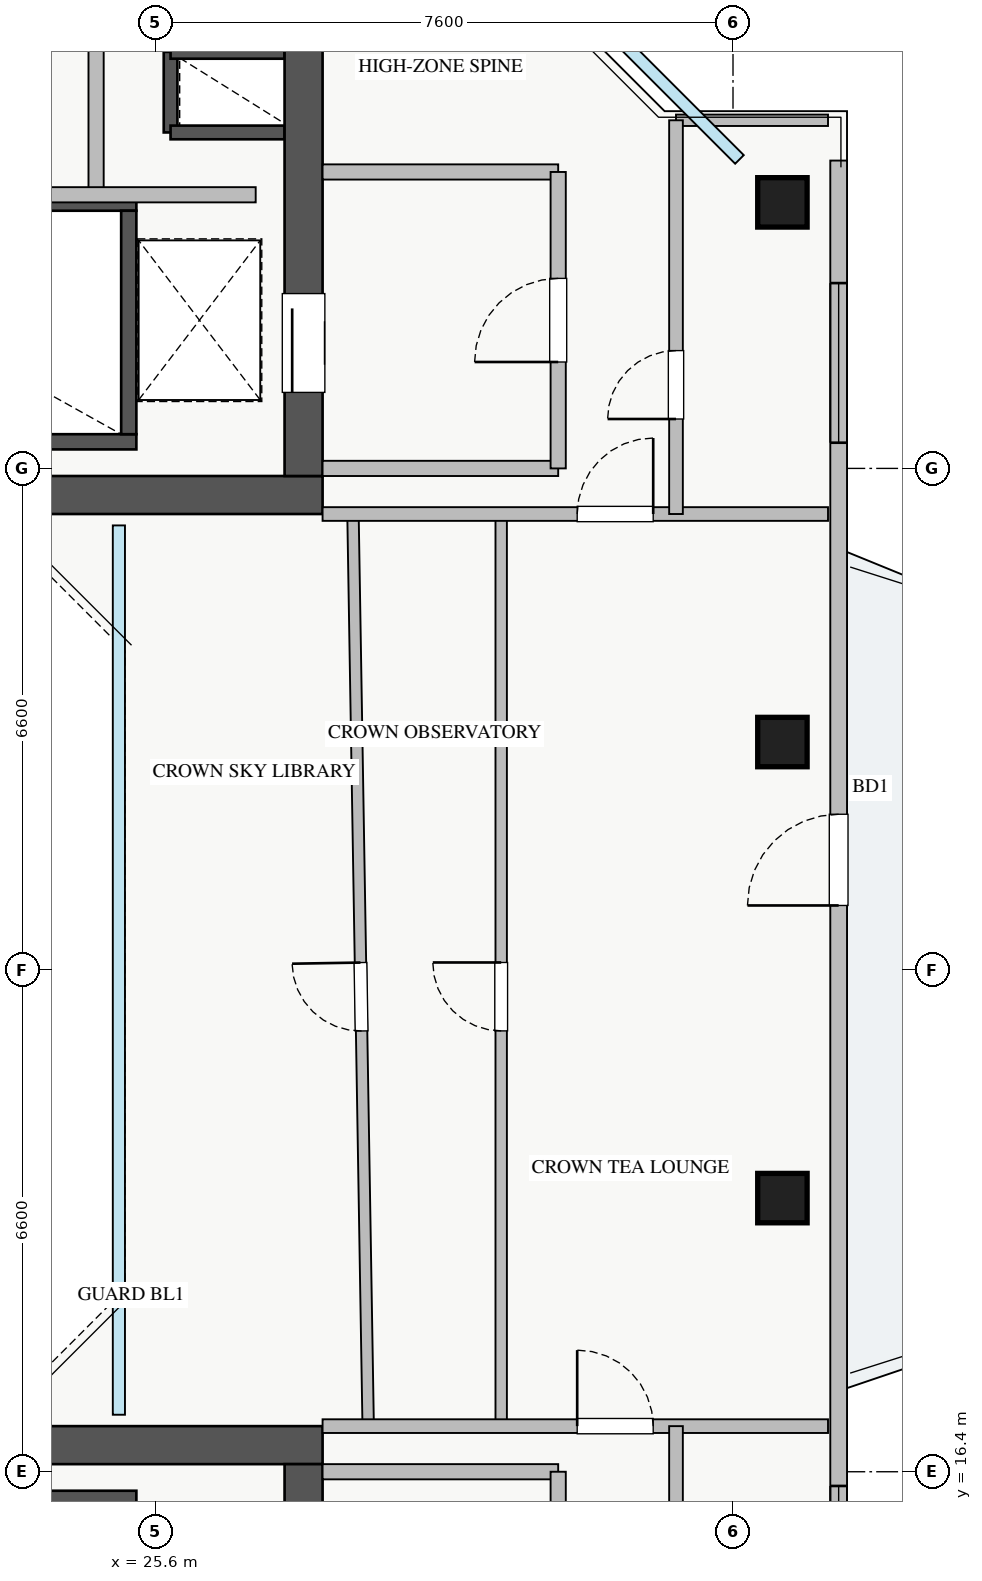
"""IFC4 building model, lengths in metres.
Left out: names, types, materials, properties, quantities, classifications, styles, units other than length and angle.
Written with IfcOpenShell. Run it as: python <this file> out.ifc"""

import sys

from ifc_helpers import new_model, si_unit, direction, frame, frame_2d, origin, origin_2d, place, context, subcontext, project, spatial, rectangle, extrude, source, transform, mapped, element, fill, save


model = new_model("IFC4")
c1 = context("Model", 3, precision=1e-05, world=origin(), true_north=direction((0.0, 1.0)))
c2 = subcontext(c1, "Body", "Model", "MODEL_VIEW")
j1 = project(units=[si_unit("LENGTHUNIT", "METRE"), si_unit("PLANEANGLEUNIT", "RADIAN")], contexts=[c1])
p1 = place(None, origin())
s1 = spatial("IfcSite", under=j1, at=p1, CompositionType="ELEMENT")
p2 = place(p1, origin())
s2 = spatial("IfcBuilding", under=s1, at=p2, CompositionType="ELEMENT")
p3 = place(p2, frame((0.0, 0.0, 260.0)))
s3 = spatial("IfcBuildingStorey", under=s2, at=p3, CompositionType="ELEMENT", Elevation=260.0)
p4 = place(p3, frame((25.8, 34.02, 0.0), z_axis=(0.0, 0.0, 1.0), x_axis=(0.0, 1.0, 0.0)))
e1 = element("IfcWall", 1, at=p4, inside=s3, PredefinedType="SHEAR", context=c2, shape_type="SweptSolid", body=[
    extrude(rectangle(XDim=1.06, YDim=0.18, at=frame_2d((0.53, 0.0))), origin(), (0.0, 0.0, 1.0), 3.03),
])
for number, where, z_axis, x_axis in (
    (2, (25.8, 35.08, 0.0), (0.0, 0.0, 1.0), (1.0, 0.0, 0.0)),
    (3, (25.8, 34.02, 0.0), (0.0, 0.0, 1.0), (1.0, 0.0, 0.0)),
):
    element("IfcWall", number, at=place(p3, frame(where, z_axis=z_axis, x_axis=x_axis)), inside=s3, PredefinedType="SHEAR", context=c2, shape_type="SweptSolid", body=[
        extrude(rectangle(XDim=1.5, YDim=0.18, at=frame_2d((0.75, 0.0))), origin(), (0.0, 0.0, 1.0), 3.03),
    ])
p5 = place(p3, frame((18.2, 29.95, 0.0), z_axis=(0.0, 0.0, 1.0), x_axis=(1.0, 0.0, 0.0)))
e4 = element("IfcWall", 4, at=p5, inside=s3, PredefinedType="SHEAR", context=c2, shape_type="SweptSolid", body=[
    extrude(rectangle(XDim=7.15, YDim=0.2, at=frame_2d((3.575, 0.0))), origin(), (0.0, 0.0, 1.0), 3.25),
])
p6 = place(p3, frame((18.2, 33.09, 0.0), z_axis=(0.0, 0.0, 1.0), x_axis=(1.0, 0.0, 0.0)))
e5 = element("IfcWall", 5, at=p6, inside=s3, PredefinedType="SHEAR", context=c2, shape_type="SweptSolid", body=[
    extrude(rectangle(XDim=7.15, YDim=0.2, at=frame_2d((3.575, 0.0))), origin(), (0.0, 0.0, 1.0), 3.25),
])
p7 = place(p6, frame((0.35, 0.0, 0.0)))
e6 = element("IfcOpeningElement", 6, at=p7, cuts=e5, PredefinedType="OPENING", context=c2, shape_type="SweptSolid", body=[
    extrude(rectangle(XDim=1.1, YDim=2.05, at=frame_2d((0.55, 1.025))), frame((0.0, 0.11, 0.0), z_axis=(0.0, -1.0, 0.0), x_axis=(1.0, 0.0, 0.0)), (0.0, 0.0, 1.0), 0.22),
])
p8 = place(p3, frame((25.25, 30.05, 0.0), z_axis=(0.0, 0.0, 1.0), x_axis=(0.0, 1.0, 0.0)))
e7 = element("IfcWall", 7, at=p8, inside=s3, PredefinedType="SHEAR", context=c2, shape_type="SweptSolid", body=[
    extrude(rectangle(XDim=2.94, YDim=0.2, at=frame_2d((1.47, 0.0))), origin(), (0.0, 0.0, 1.0), 3.25),
])
p9 = place(p3, frame((18.2, 16.05, 0.0), z_axis=(0.0, 0.0, 1.0), x_axis=(1.0, 0.0, 0.0)))
e8 = element("IfcWall", 8, at=p9, inside=s3, PredefinedType="SHEAR", context=c2, shape_type="SweptSolid", body=[
    extrude(rectangle(XDim=7.15, YDim=0.2, at=frame_2d((3.575, 0.0))), origin(), (0.0, 0.0, 1.0), 3.25),
])
p10 = place(p3, frame((10.2, 29.25, 0.0), z_axis=(0.0, 0.0, 1.0), x_axis=(1.0, 0.0, 0.0)))
e9 = element("IfcWall", 9, at=p10, inside=s3, PredefinedType="SHEAR", context=c2, shape_type="SweptSolid", body=[
    extrude(rectangle(XDim=17.6, YDim=0.5, at=frame_2d((8.8, 0.0))), origin(), (0.0, 0.0, 1.0), 3.25),
])
p11 = place(p3, frame((27.55, 29.5, 0.0), z_axis=(0.0, 0.0, 1.0), x_axis=(0.0, 1.0, 0.0)))
e10 = element("IfcWall", 10, at=p11, inside=s3, PredefinedType="SHEAR", context=c2, shape_type="SweptSolid", body=[
    extrude(rectangle(XDim=6.2, YDim=0.5, at=frame_2d((3.1, 0.0))), origin(), (0.0, 0.0, 1.0), 3.25),
])
p12 = place(p11, frame((1.1, 0.0, 0.0)))
e11 = element("IfcOpeningElement", 11, at=p12, cuts=e10, PredefinedType="OPENING", context=c2, shape_type="SweptSolid", body=[
    extrude(rectangle(XDim=1.3, YDim=2.05, at=frame_2d((0.65, 1.025))), frame((0.0, 0.26, 0.0), z_axis=(0.0, -1.0, 0.0), x_axis=(1.0, 0.0, 0.0)), (0.0, 0.0, 1.0), 0.52),
])
p13 = place(p3, frame((10.2, 16.75, 0.0), z_axis=(0.0, 0.0, 1.0), x_axis=(1.0, 0.0, 0.0)))
e12 = element("IfcWall", 12, at=p13, inside=s3, PredefinedType="SHEAR", context=c2, shape_type="SweptSolid", body=[
    extrude(rectangle(XDim=17.6, YDim=0.5, at=frame_2d((8.8, 0.0))), origin(), (0.0, 0.0, 1.0), 3.25),
])
p14 = place(p3, frame((27.55, 10.3, 0.0), z_axis=(0.0, 0.0, 1.0), x_axis=(0.0, 1.0, 0.0)))
e13 = element("IfcWall", 13, at=p14, inside=s3, PredefinedType="SHEAR", context=c2, shape_type="SweptSolid", body=[
    extrude(rectangle(XDim=6.2, YDim=0.5, at=frame_2d((3.1, 0.0))), origin(), (0.0, 0.0, 1.0), 3.25),
])
p15 = place(p14, frame((2.1, 0.0, 0.0)))
e14 = element("IfcOpeningElement", 14, at=p15, cuts=e13, PredefinedType="OPENING", context=c2, shape_type="SweptSolid", body=[
    extrude(rectangle(XDim=1.3, YDim=2.05, at=frame_2d((0.65, 1.025))), frame((0.0, 0.26, 0.0), z_axis=(0.0, -1.0, 0.0), x_axis=(1.0, 0.0, 0.0)), (0.0, 0.0, 1.0), 0.52),
])
m1 = source(origin(), c2, "Body", "SweptSolid", [
    extrude(rectangle(XDim=0.65, YDim=0.65, at=origin_2d()), origin(), (0.0, 0.0, 1.0), 3.25),
])
for number, where, z_axis, x_axis in (
    (15, (33.85, 20.0, 0.0), (0.0, 0.0, 1.0), (1.0, 0.0, 0.0)),
    (16, (33.85, 26.0, 0.0), (0.0, 0.0, 1.0), (1.0, 0.0, 0.0)),
    (17, (33.85, 33.1, 0.0), (0.0, 0.0, 1.0), (1.0, 0.0, 0.0)),
):
    element("IfcColumn", number, at=place(p3, frame(where, z_axis=z_axis, x_axis=x_axis)), inside=s3, PredefinedType="COLUMN", context=c2, shape_type="MappedRepresentation", body=[
        mapped(m1, transform((0.0, 0.0, 0.0), x_axis=(1.0, 0.0, 0.0), y_axis=(0.0, 1.0, 0.0), z_axis=(0.0, 0.0, 1.0), scale=1.0)),
    ])
p16 = place(p3, frame((34.59, 12.35, 0.0), z_axis=(0.0, 0.0, 1.0), x_axis=(0.0, 1.0, 0.0)))
e18 = element("IfcWall", 18, at=p16, inside=s3, PredefinedType="STANDARD", context=c2, shape_type="SweptSolid", body=[
    extrude(rectangle(XDim=21.3, YDim=0.22, at=frame_2d((10.65, 0.0))), origin(), (0.0, 0.0, 1.0), 2.57),
])
p17 = place(p16, frame((11.5, 0.0, 0.0)))
e19 = element("IfcOpeningElement", 19, at=p17, cuts=e18, PredefinedType="OPENING", context=c2, shape_type="SweptSolid", body=[
    extrude(rectangle(XDim=1.2, YDim=2.1, at=frame_2d((0.6, 1.05))), frame((0.0, 0.12, 0.0), z_axis=(0.0, -1.0, 0.0), x_axis=(1.0, 0.0, 0.0)), (0.0, 0.0, 1.0), 0.24),
])
p18 = place(p16, frame((1.463, 0.0, 0.9)))
e20 = element("IfcOpeningElement", 20, at=p18, cuts=e18, PredefinedType="OPENING", context=c2, shape_type="SweptSolid", body=[
    extrude(rectangle(XDim=2.4, YDim=1.48, at=frame_2d((1.2, 0.74))), frame((0.0, 0.12, 0.0), z_axis=(0.0, -1.0, 0.0), x_axis=(1.0, 0.0, 0.0)), (0.0, 0.0, 1.0), 0.24),
])
p19 = place(p16, frame((17.588, 0.0, 0.9)))
e21 = element("IfcOpeningElement", 21, at=p19, cuts=e18, PredefinedType="OPENING", context=c2, shape_type="SweptSolid", body=[
    extrude(rectangle(XDim=2.1, YDim=1.48, at=frame_2d((1.05, 0.74))), frame((0.0, 0.12, 0.0), z_axis=(0.0, -1.0, 0.0), x_axis=(1.0, 0.0, 0.0)), (0.0, 0.0, 1.0), 0.24),
])
for number, where, z_axis, x_axis in (
    (22, (27.8, 29.6, 0.0), (0.0, 0.0, 1.0), (1.0, 0.0, 0.0)),
    (23, (27.8, 33.5, 0.0), (0.0, 0.0, 1.0), (1.0, 0.0, 0.0)),
):
    element("IfcWall", number, at=place(p3, frame(where, z_axis=z_axis, x_axis=x_axis)), inside=s3, PredefinedType="PARTITIONING", context=c2, shape_type="SweptSolid", body=[
        extrude(rectangle(XDim=3.1, YDim=0.2, at=frame_2d((1.55, 0.0))), origin(), (0.0, 0.0, 1.0), 3.03),
    ])
p20 = place(p3, frame((30.9, 29.6, 0.0), z_axis=(0.0, 0.0, 1.0), x_axis=(0.0, 1.0, 0.0)))
e24 = element("IfcWall", 24, at=p20, inside=s3, PredefinedType="PARTITIONING", context=c2, shape_type="SweptSolid", body=[
    extrude(rectangle(XDim=3.9, YDim=0.2, at=frame_2d((1.95, 0.0))), origin(), (0.0, 0.0, 1.0), 2.781),
])
p21 = place(p20, frame((1.4, 0.0, 0.0)))
e25 = element("IfcOpeningElement", 25, at=p21, cuts=e24, PredefinedType="OPENING", context=c2, shape_type="SweptSolid", body=[
    extrude(rectangle(XDim=1.1, YDim=2.05, at=frame_2d((0.55, 1.025))), frame((0.0, 0.11, 0.0), z_axis=(0.0, -1.0, 0.0), x_axis=(1.0, 0.0, 0.0)), (0.0, 0.0, 1.0), 0.22),
])
p22 = place(p3, frame((27.8, 16.4, 0.0), z_axis=(0.0, 0.0, 1.0), x_axis=(1.0, 0.0, 0.0)))
e26 = element("IfcWall", 26, at=p22, inside=s3, PredefinedType="PARTITIONING", context=c2, shape_type="SweptSolid", body=[
    extrude(rectangle(XDim=3.1, YDim=0.2, at=frame_2d((1.55, 0.0))), origin(), (0.0, 0.0, 1.0), 3.03),
])
p23 = place(p3, frame((30.9, 12.5, 0.0), z_axis=(0.0, 0.0, 1.0), x_axis=(0.0, 1.0, 0.0)))
e27 = element("IfcWall", 27, at=p23, inside=s3, PredefinedType="PARTITIONING", context=c2, shape_type="SweptSolid", body=[
    extrude(rectangle(XDim=3.9, YDim=0.2, at=frame_2d((1.95, 0.0))), origin(), (0.0, 0.0, 1.0), 2.781),
])
p24 = place(p23, frame((1.4, 0.0, 0.0)))
e28 = element("IfcOpeningElement", 28, at=p24, cuts=e27, PredefinedType="OPENING", context=c2, shape_type="SweptSolid", body=[
    extrude(rectangle(XDim=1.1, YDim=2.05, at=frame_2d((0.55, 1.025))), frame((0.0, 0.11, 0.0), z_axis=(0.0, -1.0, 0.0), x_axis=(1.0, 0.0, 0.0)), (0.0, 0.0, 1.0), 0.22),
])
p25 = place(p3, frame((24.82, 33.2, 0.0), z_axis=(0.0, 0.0, 1.0), x_axis=(0.0, 1.0, 0.0)))
e29 = element("IfcWall", 29, at=p25, inside=s3, PredefinedType="PARTITIONING", context=c2, shape_type="SweptSolid", body=[
    extrude(rectangle(XDim=2.65, YDim=0.2, at=frame_2d((1.325, 0.0))), origin(), (0.0, 0.0, 1.0), 3.03),
])
p26 = place(p3, frame((21.75, 33.2, 0.0), z_axis=(0.0, 0.0, 1.0), x_axis=(1.0, 0.0, 0.0)))
e30 = element("IfcWall", 30, at=p26, inside=s3, PredefinedType="PARTITIONING", context=c2, shape_type="SweptSolid", body=[
    extrude(rectangle(XDim=5.17, YDim=0.2, at=frame_2d((2.585, 0.0))), origin(), (0.0, 0.0, 1.0), 3.03),
])
p27 = place(p3, frame((28.2, 29.0, 0.0), z_axis=(0.0, 0.0, 1.0), x_axis=(0.016660285018, -0.99986120782, 0.0)))
e31 = element("IfcWall", 31, at=p27, inside=s3, PredefinedType="PARTITIONING", context=c2, shape_type="SweptSolid", body=[
    extrude(rectangle(XDim=12.002, YDim=0.15, at=frame_2d((6.001, 0.0))), origin(), (0.0, 0.0, 1.0), 3.03),
])
p28 = place(p27, frame((5.902, 0.0, 0.0)))
e32 = element("IfcOpeningElement", 32, at=p28, cuts=e31, PredefinedType="OPENING", context=c2, shape_type="SweptSolid", body=[
    extrude(rectangle(XDim=0.9, YDim=2.05, at=frame_2d((0.45, 1.025))), frame((0.0, 0.085, 0.0), z_axis=(0.0, -1.0, 0.0), x_axis=(1.0, 0.0, 0.0)), (0.0, 0.0, 1.0), 0.17),
])
p29 = place(p3, frame((30.15, 17.0, 0.0), z_axis=(0.0, 0.0, 1.0), x_axis=(0.0, 1.0, 0.0)))
e33 = element("IfcWall", 33, at=p29, inside=s3, PredefinedType="PARTITIONING", context=c2, shape_type="SweptSolid", body=[
    extrude(rectangle(XDim=12.0, YDim=0.15, at=frame_2d((6.0, 0.0))), origin(), (0.0, 0.0, 1.0), 3.03),
])
p30 = place(p29, frame((5.2, 0.0, 0.0)))
e34 = element("IfcOpeningElement", 34, at=p30, cuts=e33, PredefinedType="OPENING", context=c2, shape_type="SweptSolid", body=[
    extrude(rectangle(XDim=0.9, YDim=2.05, at=frame_2d((0.45, 1.025))), frame((0.0, 0.085, 0.0), z_axis=(0.0, -1.0, 0.0), x_axis=(1.0, 0.0, 0.0)), (0.0, 0.0, 1.0), 0.17),
])
p31 = place(p3, frame((27.8, 17.0, 0.0), z_axis=(0.0, 0.0, 1.0), x_axis=(1.0, 0.0, 0.0)))
e35 = element("IfcWall", 35, at=p31, inside=s3, PredefinedType="PARTITIONING", context=c2, shape_type="SweptSolid", body=[
    extrude(rectangle(XDim=6.65, YDim=0.18, at=frame_2d((3.325, 0.0))), origin(), (0.0, 0.0, 1.0), 3.03),
])
p32 = place(p31, frame((3.35, 0.0, 0.0)))
e36 = element("IfcOpeningElement", 36, at=p32, cuts=e35, PredefinedType="OPENING", context=c2, shape_type="SweptSolid", body=[
    extrude(rectangle(XDim=1.0, YDim=2.05, at=frame_2d((0.5, 1.025))), frame((0.0, 0.1, 0.0), z_axis=(0.0, -1.0, 0.0), x_axis=(1.0, 0.0, 0.0)), (0.0, 0.0, 1.0), 0.2),
])
p33 = place(p3, frame((27.8, 29.0, 0.0), z_axis=(0.0, 0.0, 1.0), x_axis=(1.0, 0.0, 0.0)))
e37 = element("IfcWall", 37, at=p33, inside=s3, PredefinedType="PARTITIONING", context=c2, shape_type="SweptSolid", body=[
    extrude(rectangle(XDim=6.65, YDim=0.18, at=frame_2d((3.325, 0.0))), origin(), (0.0, 0.0, 1.0), 3.03),
])
p34 = place(p33, frame((3.35, 0.0, 0.0)))
e38 = element("IfcOpeningElement", 38, at=p34, cuts=e37, PredefinedType="OPENING", context=c2, shape_type="SweptSolid", body=[
    extrude(rectangle(XDim=1.0, YDim=2.05, at=frame_2d((0.5, 1.025))), frame((0.0, 0.1, 0.0), z_axis=(0.0, -1.0, 0.0), x_axis=(1.0, 0.0, 0.0)), (0.0, 0.0, 1.0), 0.2),
])
p35 = place(p3, frame((32.45, 34.18, 0.0), z_axis=(0.0, 0.0, 1.0), x_axis=(1.0, 0.0, 0.0)))
e39 = element("IfcWall", 39, at=p35, inside=s3, PredefinedType="PARTITIONING", context=c2, shape_type="SweptSolid", body=[
    extrude(rectangle(XDim=2.0, YDim=0.15, at=frame_2d((1.0, 0.0))), origin(), (0.0, 0.0, 1.0), 3.03),
])
p36 = place(p3, frame((32.45, 29.0, 0.0), z_axis=(0.0, 0.0, 1.0), x_axis=(0.0, 1.0, 0.0)))
e40 = element("IfcWall", 40, at=p36, inside=s3, PredefinedType="PARTITIONING", context=c2, shape_type="SweptSolid", body=[
    extrude(rectangle(XDim=5.18, YDim=0.18, at=frame_2d((2.59, 0.0))), origin(), (0.0, 0.0, 1.0), 3.03),
])
p37 = place(p36, frame((1.25, 0.0, 0.0)))
e41 = element("IfcOpeningElement", 41, at=p37, cuts=e40, PredefinedType="OPENING", context=c2, shape_type="SweptSolid", body=[
    extrude(rectangle(XDim=0.9, YDim=2.05, at=frame_2d((0.45, 1.025))), frame((0.0, 0.1, 0.0), z_axis=(0.0, -1.0, 0.0), x_axis=(1.0, 0.0, 0.0)), (0.0, 0.0, 1.0), 0.2),
])
p38 = place(p3, frame((32.45, 11.82, 0.0), z_axis=(0.0, 0.0, 1.0), x_axis=(0.0, 1.0, 0.0)))
e42 = element("IfcWall", 42, at=p38, inside=s3, PredefinedType="PARTITIONING", context=c2, shape_type="SweptSolid", body=[
    extrude(rectangle(XDim=5.18, YDim=0.18, at=frame_2d((2.59, 0.0))), origin(), (0.0, 0.0, 1.0), 3.03),
])
p39 = place(p38, frame((1.25, 0.0, 0.0)))
e43 = element("IfcOpeningElement", 43, at=p39, cuts=e42, PredefinedType="OPENING", context=c2, shape_type="SweptSolid", body=[
    extrude(rectangle(XDim=0.9, YDim=2.05, at=frame_2d((0.45, 1.025))), frame((0.0, 0.1, 0.0), z_axis=(0.0, -1.0, 0.0), x_axis=(1.0, 0.0, 0.0)), (0.0, 0.0, 1.0), 0.2),
])
m2 = source(origin(), c2, "Body", "SweptSolid", [
    extrude(rectangle(XDim=1.2, YDim=2.1, at=frame_2d((0.6, 1.05))), frame((0.0, 0.025, 0.0), z_axis=(0.0, -1.0, 0.0), x_axis=(1.0, 0.0, 0.0)), (0.0, 0.0, 1.0), 0.05),
])
p40 = place(p17, origin())
e44 = element("IfcDoor", 44, at=p40, inside=s3, OperationType="SINGLE_SWING_LEFT", PredefinedType="DOOR", context=c2, shape_type="MappedRepresentation", body=[
    mapped(m2, transform((0.0, 0.0, 0.0), x_axis=(1.0, 0.0, 0.0), y_axis=(0.0, 1.0, 0.0), z_axis=(0.0, 0.0, 1.0), scale=1.0)),
])
fill(e19, e44)
m3 = source(origin(), c2, "Body", "SweptSolid", [
    extrude(rectangle(XDim=2.4, YDim=1.48, at=frame_2d((1.2, 0.74))), frame((0.0, 0.03, 0.0), z_axis=(0.0, -1.0, 0.0), x_axis=(1.0, 0.0, 0.0)), (0.0, 0.0, 1.0), 0.06),
])
p41 = place(p18, origin())
e45 = element("IfcWindow", 45, at=p41, inside=s3, PartitioningType="TRIPLE_PANEL_VERTICAL", PredefinedType="WINDOW", context=c2, shape_type="MappedRepresentation", body=[
    mapped(m3, transform((0.0, 0.0, 0.0), x_axis=(1.0, 0.0, 0.0), y_axis=(0.0, 1.0, 0.0), z_axis=(0.0, 0.0, 1.0), scale=1.0)),
])
fill(e20, e45)
m4 = source(origin(), c2, "Body", "SweptSolid", [
    extrude(rectangle(XDim=2.1, YDim=1.48, at=frame_2d((1.05, 0.74))), frame((0.0, 0.03, 0.0), z_axis=(0.0, -1.0, 0.0), x_axis=(1.0, 0.0, 0.0)), (0.0, 0.0, 1.0), 0.06),
])
p42 = place(p19, origin())
e46 = element("IfcWindow", 46, at=p42, inside=s3, PartitioningType="TRIPLE_PANEL_VERTICAL", PredefinedType="WINDOW", context=c2, shape_type="MappedRepresentation", body=[
    mapped(m4, transform((0.0, 0.0, 0.0), x_axis=(1.0, 0.0, 0.0), y_axis=(0.0, 1.0, 0.0), z_axis=(0.0, 0.0, 1.0), scale=1.0)),
])
fill(e21, e46)
m5 = source(origin(), c2, "Body", "SweptSolid", [
    extrude(rectangle(XDim=1.3, YDim=2.05, at=frame_2d((0.65, 1.025))), frame((0.0, 0.025, 0.0), z_axis=(0.0, -1.0, 0.0), x_axis=(1.0, 0.0, 0.0)), (0.0, 0.0, 1.0), 0.05),
])
p43 = place(p12, origin())
e47 = element("IfcDoor", 47, at=p43, inside=s3, OperationType="SLIDING_TO_LEFT", PredefinedType="DOOR", context=c2, shape_type="MappedRepresentation", body=[
    mapped(m5, transform((0.0, 0.0, 0.0), x_axis=(1.0, 0.0, 0.0), y_axis=(0.0, 1.0, 0.0), z_axis=(0.0, 0.0, 1.0), scale=1.0)),
])
fill(e11, e47)
m6 = source(origin(), c2, "Body", "SweptSolid", [
    extrude(rectangle(XDim=1.1, YDim=2.05, at=frame_2d((0.55, 1.025))), frame((0.0, 0.025, 0.0), z_axis=(0.0, -1.0, 0.0), x_axis=(1.0, 0.0, 0.0)), (0.0, 0.0, 1.0), 0.05),
])
p44 = place(p21, origin())
e48 = element("IfcDoor", 48, at=p44, inside=s3, OperationType="SINGLE_SWING_LEFT", PredefinedType="DOOR", context=c2, shape_type="MappedRepresentation", body=[
    mapped(m6, transform((0.0, 0.0, 0.0), x_axis=(1.0, 0.0, 0.0), y_axis=(0.0, 1.0, 0.0), z_axis=(0.0, 0.0, 1.0), scale=1.0)),
])
fill(e25, e48)
m7 = source(origin(), c2, "Body", "SweptSolid", [
    extrude(rectangle(XDim=0.9, YDim=2.05, at=frame_2d((0.45, 1.025))), frame((0.0, 0.025, 0.0), z_axis=(0.0, -1.0, 0.0), x_axis=(1.0, 0.0, 0.0)), (0.0, 0.0, 1.0), 0.05),
])
p45 = place(p28, frame((0.9, 0.0, 0.0), z_axis=(0.0, 0.0, 1.0), x_axis=(-1.0, 0.0, 0.0)))
e49 = element("IfcDoor", 49, at=p45, inside=s3, OperationType="SINGLE_SWING_LEFT", PredefinedType="DOOR", context=c2, shape_type="MappedRepresentation", body=[
    mapped(m7, transform((0.0, 0.0, 0.0), x_axis=(1.0, 0.0, 0.0), y_axis=(0.0, 1.0, 0.0), z_axis=(0.0, 0.0, 1.0), scale=1.0)),
])
fill(e32, e49)
p46 = place(p30, origin())
e50 = element("IfcDoor", 50, at=p46, inside=s3, OperationType="SINGLE_SWING_RIGHT", PredefinedType="DOOR", context=c2, shape_type="MappedRepresentation", body=[
    mapped(m7, transform((0.0, 0.0, 0.0), x_axis=(1.0, 0.0, 0.0), y_axis=(0.0, 1.0, 0.0), z_axis=(0.0, 0.0, 1.0), scale=1.0)),
])
fill(e34, e50)
m8 = source(origin(), c2, "Body", "SweptSolid", [
    extrude(rectangle(XDim=1.0, YDim=2.05, at=frame_2d((0.5, 1.025))), frame((0.0, 0.025, 0.0), z_axis=(0.0, -1.0, 0.0), x_axis=(1.0, 0.0, 0.0)), (0.0, 0.0, 1.0), 0.05),
])
p47 = place(p32, origin())
e51 = element("IfcDoor", 51, at=p47, inside=s3, OperationType="SINGLE_SWING_LEFT", PredefinedType="DOOR", context=c2, shape_type="MappedRepresentation", body=[
    mapped(m8, transform((0.0, 0.0, 0.0), x_axis=(1.0, 0.0, 0.0), y_axis=(0.0, 1.0, 0.0), z_axis=(0.0, 0.0, 1.0), scale=1.0)),
])
fill(e36, e51)
p48 = place(p34, origin())
e52 = element("IfcDoor", 52, at=p48, inside=s3, OperationType="SINGLE_SWING_RIGHT", PredefinedType="DOOR", context=c2, shape_type="MappedRepresentation", body=[
    mapped(m8, transform((0.0, 0.0, 0.0), x_axis=(1.0, 0.0, 0.0), y_axis=(0.0, 1.0, 0.0), z_axis=(0.0, 0.0, 1.0), scale=1.0)),
])
fill(e38, e52)
p49 = place(p37, origin())
e53 = element("IfcDoor", 53, at=p49, inside=s3, OperationType="SINGLE_SWING_LEFT", PredefinedType="DOOR", context=c2, shape_type="MappedRepresentation", body=[
    mapped(m7, transform((0.0, 0.0, 0.0), x_axis=(1.0, 0.0, 0.0), y_axis=(0.0, 1.0, 0.0), z_axis=(0.0, 0.0, 1.0), scale=1.0)),
])
fill(e41, e53)
save(model, sys.argv[1])
